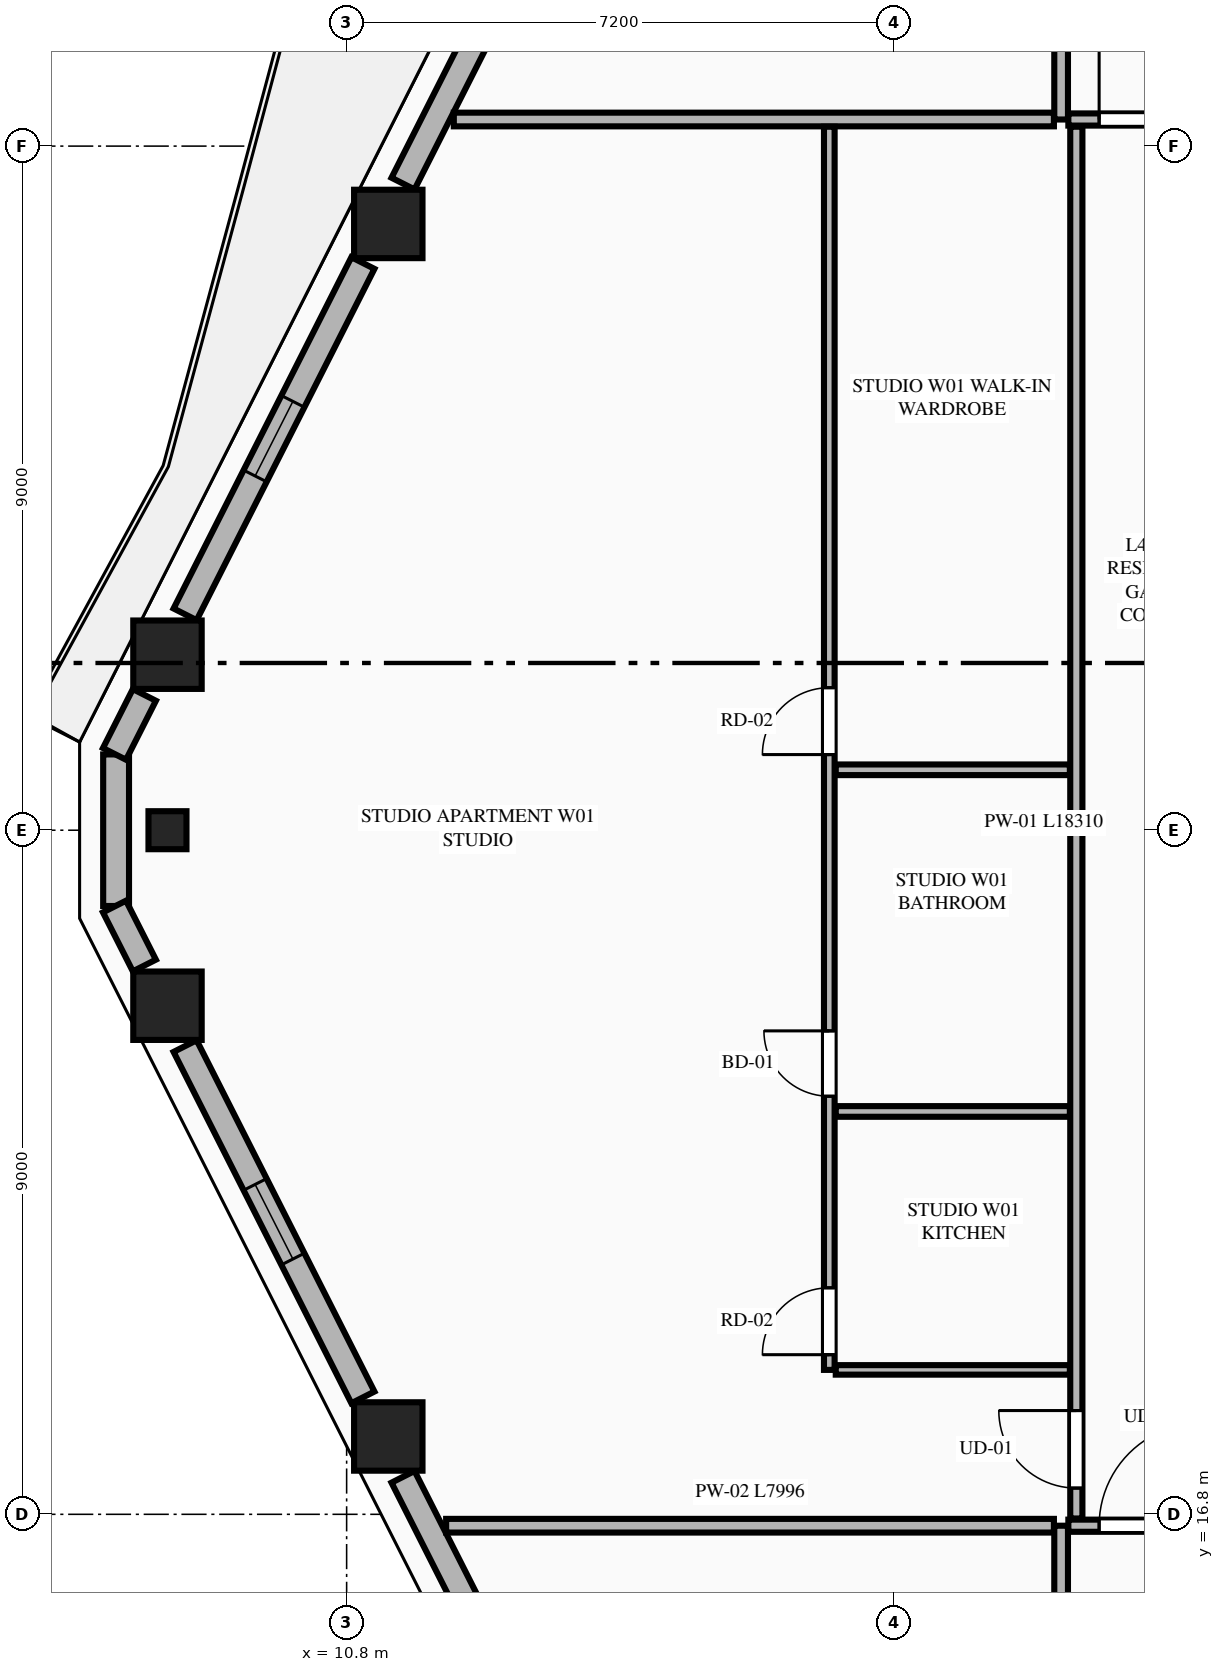
"""IFC4 building model, lengths in metres.
Left out: names, types, materials, properties, quantities, classifications, styles, units other than length and angle.
Written with IfcOpenShell. Run it as: python <this file> out.ifc"""

import sys

from ifc_helpers import new_model, si_unit, direction, frame, frame_2d, origin, origin_2d, place, context, subcontext, project, spatial, rectangle, extrude, element, fill, save


model = new_model("IFC4")
c1 = context("Model", 3, precision=1e-05, world=origin(), true_north=direction((0.0, 1.0)))
c2 = subcontext(c1, "Body", "Model", "MODEL_VIEW")
j1 = project(units=[si_unit("LENGTHUNIT", "METRE"), si_unit("PLANEANGLEUNIT", "RADIAN")], contexts=[c1])
p1 = place(None, origin())
s1 = spatial("IfcSite", under=j1, at=p1, CompositionType="ELEMENT")
p2 = place(p1, origin())
s2 = spatial("IfcBuilding", under=s1, at=p2, CompositionType="ELEMENT")
p3 = place(p2, frame((0.0, 0.0, 160.6)))
s3 = spatial("IfcBuildingStorey", under=s2, at=p3, CompositionType="ELEMENT", Elevation=160.6)
for number, where, z_axis, x_axis in (
    (1, (11.348, 33.776, 0.0), (0.0, 0.0, 1.0), (1.0, 0.0, 0.0)),
    (2, (8.443, 28.109, 0.0), (0.0, 0.0, 1.0), (1.0, 0.0, 0.0)),
    (3, (8.443, 23.491, 0.0), (0.0, 0.0, 1.0), (1.0, 0.0, 0.0)),
    (4, (11.348, 17.824, 0.0), (0.0, 0.0, 1.0), (1.0, 0.0, 0.0)),
):
    element("IfcColumn", number, at=place(p3, frame(where, z_axis=z_axis, x_axis=x_axis)), inside=s3, PredefinedType="COLUMN", context=c2, shape_type="SweptSolid", body=[
        extrude(rectangle(XDim=0.9, YDim=0.9, at=origin_2d()), origin(), (0.0, 0.0, 1.0), 3.55),
    ])
p4 = place(p3, frame((8.443, 25.8, 0.0), z_axis=(0.0, 0.0, 1.0), x_axis=(0.0, -1.0, 0.0)))
e5 = element("IfcColumn", 5, at=p4, inside=s3, PredefinedType="PILASTER", context=c2, shape_type="SweptSolid", body=[
    extrude(rectangle(XDim=0.5, YDim=0.35, at=origin_2d()), origin(), (0.0, 0.0, 1.0), 3.55),
])
p5 = place(p3, frame((7.767, 26.797, 0.0), z_axis=(0.0, 0.0, 1.0), x_axis=(0.0, -1.0, 0.0)))
e6 = element("IfcWall", 6, at=p5, inside=s3, PredefinedType="STANDARD", context=c2, shape_type="SweptSolid", body=[
    extrude(rectangle(XDim=1.994, YDim=0.34, at=frame_2d((0.997, 0.0))), origin(), (0.0, 0.0, 1.0), 3.34),
])
p6 = place(p3, frame((13.982, 39.129, 0.0), z_axis=(0.0, 0.0, 1.0), x_axis=(-0.451491174807, -0.892275584711, 0.0)))
e7 = element("IfcWall", 7, at=p6, inside=s3, PredefinedType="STANDARD", context=c2, shape_type="SweptSolid", body=[
    extrude(rectangle(XDim=5.404, YDim=0.34, at=frame_2d((2.702, 0.0))), origin(), (0.0, 0.0, 1.0), 2.797),
])
p7 = place(p6, frame((1.555, 0.0, 0.0)))
e8 = element("IfcOpeningElement", 8, at=p7, cuts=e7, PredefinedType="OPENING", context=c2, shape_type="SweptSolid", body=[
    extrude(rectangle(XDim=1.1, YDim=2.25, at=frame_2d((0.55, 1.125))), frame((0.0, 0.18, 0.0), z_axis=(0.0, -1.0, 0.0), x_axis=(1.0, 0.0, 0.0)), (0.0, 0.0, 1.0), 0.36),
])
p8 = place(p3, frame((11.014, 33.262, 0.0), z_axis=(0.0, 0.0, 1.0), x_axis=(-0.451506699894, -0.892267728852, 0.0)))
e9 = element("IfcWall", 9, at=p8, inside=s3, PredefinedType="STANDARD", context=c2, shape_type="SweptSolid", body=[
    extrude(rectangle(XDim=5.18, YDim=0.34, at=frame_2d((2.59, 0.0))), origin(), (0.0, 0.0, 1.0), 2.797),
])
p9 = place(p8, frame((2.04, 0.0, 0.75)))
e10 = element("IfcOpeningElement", 10, at=p9, cuts=e9, PredefinedType="OPENING", context=c2, shape_type="SweptSolid", body=[
    extrude(rectangle(XDim=1.1, YDim=1.897, at=frame_2d((0.55, 0.948))), frame((0.0, 0.18, 0.0), z_axis=(0.0, -1.0, 0.0), x_axis=(1.0, 0.0, 0.0)), (0.0, 0.0, 1.0), 0.36),
])
p10 = place(p3, frame((8.139, 27.58, 0.0), z_axis=(0.0, 0.0, 1.0), x_axis=(-0.451586578297, -0.892227304168, 0.0)))
e11 = element("IfcWall", 11, at=p10, inside=s3, PredefinedType="STANDARD", context=c2, shape_type="SweptSolid", body=[
    extrude(rectangle(XDim=0.87, YDim=0.34, at=frame_2d((0.435, 0.0))), origin(), (0.0, 0.0, 1.0), 3.34),
])
p11 = place(p3, frame((7.746, 24.796, 0.0), z_axis=(0.0, 0.0, 1.0), x_axis=(0.451699687084, -0.892170046957, 0.0)))
e12 = element("IfcWall", 12, at=p11, inside=s3, PredefinedType="STANDARD", context=c2, shape_type="SweptSolid", body=[
    extrude(rectangle(XDim=0.87, YDim=0.34, at=frame_2d((0.435, 0.0))), origin(), (0.0, 0.0, 1.0), 3.34),
])
p12 = place(p3, frame((8.675, 22.96, 0.0), z_axis=(0.0, 0.0, 1.0), x_axis=(0.451506699894, -0.892267728852, 0.0)))
e13 = element("IfcWall", 13, at=p12, inside=s3, PredefinedType="STANDARD", context=c2, shape_type="SweptSolid", body=[
    extrude(rectangle(XDim=5.18, YDim=0.34, at=frame_2d((2.59, 0.0))), origin(), (0.0, 0.0, 1.0), 2.797),
])
p13 = place(p12, frame((2.04, 0.0, 0.75)))
e14 = element("IfcOpeningElement", 14, at=p13, cuts=e13, PredefinedType="OPENING", context=c2, shape_type="SweptSolid", body=[
    extrude(rectangle(XDim=1.1, YDim=1.897, at=frame_2d((0.55, 0.948))), frame((0.0, 0.18, 0.0), z_axis=(0.0, -1.0, 0.0), x_axis=(1.0, 0.0, 0.0)), (0.0, 0.0, 1.0), 0.36),
])
p14 = place(p3, frame((11.542, 17.293, 0.0), z_axis=(0.0, 0.0, 1.0), x_axis=(0.451491174807, -0.892275584711, 0.0)))
e15 = element("IfcWall", 15, at=p14, inside=s3, PredefinedType="STANDARD", context=c2, shape_type="SweptSolid", body=[
    extrude(rectangle(XDim=5.404, YDim=0.34, at=frame_2d((2.702, 0.0))), origin(), (0.0, 0.0, 1.0), 2.797),
])
p15 = place(p14, frame((2.152, 0.0, 0.75)))
e16 = element("IfcOpeningElement", 16, at=p15, cuts=e15, PredefinedType="OPENING", context=c2, shape_type="SweptSolid", body=[
    extrude(rectangle(XDim=1.1, YDim=1.897, at=frame_2d((0.55, 0.948))), frame((0.0, 0.18, 0.0), z_axis=(0.0, -1.0, 0.0), x_axis=(1.0, 0.0, 0.0)), (0.0, 0.0, 1.0), 0.36),
])
p16 = place(p3, frame((20.2, 4.105, 0.0), z_axis=(0.0, 0.0, 1.0), x_axis=(0.0, 1.0, 0.0)))
e17 = element("IfcWall", 17, at=p16, inside=s3, PredefinedType="PARTITIONING", context=c2, shape_type="SweptSolid", body=[
    extrude(rectangle(XDim=12.545, YDim=0.18, at=frame_2d((6.272, 0.0))), origin(), (0.0, 0.0, 1.0), 3.34),
])
p17 = place(p3, frame((20.295, 16.65, 0.0), z_axis=(0.0, 0.0, 1.0), x_axis=(1.0, 0.0, 0.0)))
e18 = element("IfcWall", 18, at=p17, inside=s3, PredefinedType="PARTITIONING", context=c2, shape_type="SweptSolid", body=[
    extrude(rectangle(XDim=24.21, YDim=0.16, at=frame_2d((12.105, 0.0))), origin(), (0.0, 0.0, 1.0), 3.34),
])
p18 = place(p17, frame((0.405, 0.0, 0.0)))
e19 = element("IfcOpeningElement", 19, at=p18, cuts=e18, PredefinedType="OPENING", context=c2, shape_type="SweptSolid", body=[
    extrude(rectangle(XDim=1.35, YDim=2.35, at=frame_2d((0.675, 1.175))), frame((0.0, 0.09, 0.0), z_axis=(0.0, -1.0, 0.0), x_axis=(1.0, 0.0, 0.0)), (0.0, 0.0, 1.0), 0.18),
])
p19 = place(p3, frame((20.2, 35.15, 0.0), z_axis=(0.0, 0.0, 1.0), x_axis=(0.0, 1.0, 0.0)))
e20 = element("IfcWall", 20, at=p19, inside=s3, PredefinedType="PARTITIONING", context=c2, shape_type="SweptSolid", body=[
    extrude(rectangle(XDim=12.345, YDim=0.18, at=frame_2d((6.173, 0.0))), origin(), (0.0, 0.0, 1.0), 3.34),
])
p20 = place(p3, frame((20.295, 35.15, 0.0), z_axis=(0.0, 0.0, 1.0), x_axis=(1.0, 0.0, 0.0)))
e21 = element("IfcWall", 21, at=p20, inside=s3, PredefinedType="PARTITIONING", context=c2, shape_type="SweptSolid", body=[
    extrude(rectangle(XDim=24.21, YDim=0.16, at=frame_2d((12.105, 0.0))), origin(), (0.0, 0.0, 1.0), 3.34),
])
p21 = place(p20, frame((0.405, 0.0, 0.0)))
e22 = element("IfcOpeningElement", 22, at=p21, cuts=e21, PredefinedType="OPENING", context=c2, shape_type="SweptSolid", body=[
    extrude(rectangle(XDim=1.35, YDim=2.35, at=frame_2d((0.675, 1.175))), frame((0.0, 0.09, 0.0), z_axis=(0.0, -1.0, 0.0), x_axis=(1.0, 0.0, 0.0)), (0.0, 0.0, 1.0), 0.18),
])
p22 = place(p3, frame((12.109, 16.65, 0.0), z_axis=(0.0, 0.0, 1.0), x_axis=(1.0, 0.0, 0.0)))
e23 = element("IfcWall", 23, at=p22, inside=s3, PredefinedType="PARTITIONING", context=c2, shape_type="SweptSolid", body=[
    extrude(rectangle(XDim=7.996, YDim=0.18, at=frame_2d((3.998, 0.0))), origin(), (0.0, 0.0, 1.0), 3.34),
])
p23 = place(p3, frame((12.21, 35.15, 0.0), z_axis=(0.0, 0.0, 1.0), x_axis=(1.0, 0.0, 0.0)))
e24 = element("IfcWall", 24, at=p23, inside=s3, PredefinedType="PARTITIONING", context=c2, shape_type="SweptSolid", body=[
    extrude(rectangle(XDim=7.895, YDim=0.18, at=frame_2d((3.948, 0.0))), origin(), (0.0, 0.0, 1.0), 3.34),
])
p24 = place(p3, frame((20.4, 16.745, 0.0), z_axis=(0.0, 0.0, 1.0), x_axis=(0.0, 1.0, 0.0)))
e25 = element("IfcWall", 25, at=p24, inside=s3, PredefinedType="PARTITIONING", context=c2, shape_type="SweptSolid", body=[
    extrude(rectangle(XDim=18.31, YDim=0.16, at=frame_2d((9.155, 0.0))), origin(), (0.0, 0.0, 1.0), 3.34),
])
p25 = place(p24, frame((0.4, 0.0, 0.0)))
e26 = element("IfcOpeningElement", 26, at=p25, cuts=e25, PredefinedType="OPENING", context=c2, shape_type="SweptSolid", body=[
    extrude(rectangle(XDim=1.02, YDim=2.25, at=frame_2d((0.51, 1.125))), frame((0.0, 0.09, 0.0), z_axis=(0.0, -1.0, 0.0), x_axis=(1.0, 0.0, 0.0)), (0.0, 0.0, 1.0), 0.18),
])
p26 = place(p3, frame((17.235, 18.7, 0.0), z_axis=(0.0, 0.0, 1.0), x_axis=(1.0, 0.0, 0.0)))
e27 = element("IfcWall", 27, at=p26, inside=s3, PredefinedType="PARTITIONING", context=c2, shape_type="SweptSolid", body=[
    extrude(rectangle(XDim=3.08, YDim=0.125, at=frame_2d((1.54, 0.0))), origin(), (0.0, 0.0, 1.0), 2.722),
])
p27 = place(p3, frame((17.15, 18.7, 0.0), z_axis=(0.0, 0.0, 1.0), x_axis=(0.0, 1.0, 0.0)))
e28 = element("IfcWall", 28, at=p27, inside=s3, PredefinedType="PLUMBINGWALL", context=c2, shape_type="SweptSolid", body=[
    extrude(rectangle(XDim=16.355, YDim=0.14, at=frame_2d((8.177, 0.0))), origin(), (0.0, 0.0, 1.0), 3.34),
])
p28 = place(p27, frame((3.6, 0.0, 0.0)))
e29 = element("IfcOpeningElement", 29, at=p28, cuts=e28, PredefinedType="OPENING", context=c2, shape_type="SweptSolid", body=[
    extrude(rectangle(XDim=0.86, YDim=2.1, at=frame_2d((0.43, 1.05))), frame((0.0, 0.08, 0.0), z_axis=(0.0, -1.0, 0.0), x_axis=(1.0, 0.0, 0.0)), (0.0, 0.0, 1.0), 0.16),
])
p29 = place(p27, frame((8.095, 0.0, 0.0)))
e30 = element("IfcOpeningElement", 30, at=p29, cuts=e28, PredefinedType="OPENING", context=c2, shape_type="SweptSolid", body=[
    extrude(rectangle(XDim=0.88, YDim=2.15, at=frame_2d((0.44, 1.075))), frame((0.0, 0.08, 0.0), z_axis=(0.0, -1.0, 0.0), x_axis=(1.0, 0.0, 0.0)), (0.0, 0.0, 1.0), 0.16),
])
p30 = place(p27, frame((0.2, 0.0, 0.0)))
e31 = element("IfcOpeningElement", 31, at=p30, cuts=e28, PredefinedType="OPENING", context=c2, shape_type="SweptSolid", body=[
    extrude(rectangle(XDim=0.88, YDim=2.15, at=frame_2d((0.44, 1.075))), frame((0.0, 0.08, 0.0), z_axis=(0.0, -1.0, 0.0), x_axis=(1.0, 0.0, 0.0)), (0.0, 0.0, 1.0), 0.16),
])
for number, where, z_axis, x_axis in (
    (32, (17.235, 22.1, 0.0), (0.0, 0.0, 1.0), (1.0, 0.0, 0.0)),
    (33, (17.235, 26.595, 0.0), (0.0, 0.0, 1.0), (1.0, 0.0, 0.0)),
):
    element("IfcWall", number, at=place(p3, frame(where, z_axis=z_axis, x_axis=x_axis)), inside=s3, PredefinedType="PLUMBINGWALL", context=c2, shape_type="SweptSolid", body=[
        extrude(rectangle(XDim=3.08, YDim=0.14, at=frame_2d((1.54, 0.0))), origin(), (0.0, 0.0, 1.0), 3.34),
    ])
p31 = place(p9, origin())
e34 = element("IfcWindow", 34, at=p31, inside=s3, PartitioningType="SINGLE_PANEL", PredefinedType="WINDOW", context=c2, shape_type="SweptSolid", body=[
    extrude(rectangle(XDim=1.1, YDim=1.897, at=frame_2d((0.55, 0.948))), frame((0.0, 0.03, 0.0), z_axis=(0.0, -1.0, 0.0), x_axis=(1.0, 0.0, 0.0)), (0.0, 0.0, 1.0), 0.06),
])
fill(e10, e34)
p32 = place(p13, origin())
e35 = element("IfcWindow", 35, at=p32, inside=s3, PartitioningType="SINGLE_PANEL", PredefinedType="WINDOW", context=c2, shape_type="SweptSolid", body=[
    extrude(rectangle(XDim=1.1, YDim=1.897, at=frame_2d((0.55, 0.948))), frame((0.0, 0.03, 0.0), z_axis=(0.0, -1.0, 0.0), x_axis=(1.0, 0.0, 0.0)), (0.0, 0.0, 1.0), 0.06),
])
fill(e14, e35)
p33 = place(p18, origin())
e36 = element("IfcDoor", 36, at=p33, inside=s3, OperationType="SINGLE_SWING_RIGHT", PredefinedType="DOOR", context=c2, shape_type="SweptSolid", body=[
    extrude(rectangle(XDim=1.35, YDim=2.35, at=frame_2d((0.675, 1.175))), frame((0.0, 0.025, 0.0), z_axis=(0.0, -1.0, 0.0), x_axis=(1.0, 0.0, 0.0)), (0.0, 0.0, 1.0), 0.05),
])
fill(e19, e36)
p34 = place(p21, origin())
e37 = element("IfcDoor", 37, at=p34, inside=s3, OperationType="SINGLE_SWING_LEFT", PredefinedType="DOOR", context=c2, shape_type="SweptSolid", body=[
    extrude(rectangle(XDim=1.35, YDim=2.35, at=frame_2d((0.675, 1.175))), frame((0.0, 0.025, 0.0), z_axis=(0.0, -1.0, 0.0), x_axis=(1.0, 0.0, 0.0)), (0.0, 0.0, 1.0), 0.05),
])
fill(e22, e37)
p35 = place(p28, origin())
e38 = element("IfcDoor", 38, at=p35, inside=s3, OperationType="SINGLE_SWING_RIGHT", PredefinedType="DOOR", context=c2, shape_type="SweptSolid", body=[
    extrude(rectangle(XDim=0.86, YDim=2.1, at=frame_2d((0.43, 1.05))), frame((0.0, 0.025, 0.0), z_axis=(0.0, -1.0, 0.0), x_axis=(1.0, 0.0, 0.0)), (0.0, 0.0, 1.0), 0.05),
])
fill(e29, e38)
p36 = place(p29, origin())
e39 = element("IfcDoor", 39, at=p36, inside=s3, OperationType="SINGLE_SWING_LEFT", PredefinedType="DOOR", context=c2, shape_type="SweptSolid", body=[
    extrude(rectangle(XDim=0.88, YDim=2.15, at=frame_2d((0.44, 1.075))), frame((0.0, 0.025, 0.0), z_axis=(0.0, -1.0, 0.0), x_axis=(1.0, 0.0, 0.0)), (0.0, 0.0, 1.0), 0.05),
])
fill(e30, e39)
p37 = place(p25, origin())
e40 = element("IfcDoor", 40, at=p37, inside=s3, OperationType="SINGLE_SWING_RIGHT", PredefinedType="DOOR", context=c2, shape_type="SweptSolid", body=[
    extrude(rectangle(XDim=1.02, YDim=2.25, at=frame_2d((0.51, 1.125))), frame((0.0, 0.025, 0.0), z_axis=(0.0, -1.0, 0.0), x_axis=(1.0, 0.0, 0.0)), (0.0, 0.0, 1.0), 0.05),
])
fill(e26, e40)
p38 = place(p30, origin())
e41 = element("IfcDoor", 41, at=p38, inside=s3, OperationType="SINGLE_SWING_LEFT", PredefinedType="DOOR", context=c2, shape_type="SweptSolid", body=[
    extrude(rectangle(XDim=0.88, YDim=2.15, at=frame_2d((0.44, 1.075))), frame((0.0, 0.025, 0.0), z_axis=(0.0, -1.0, 0.0), x_axis=(1.0, 0.0, 0.0)), (0.0, 0.0, 1.0), 0.05),
])
fill(e31, e41)
save(model, sys.argv[1])
